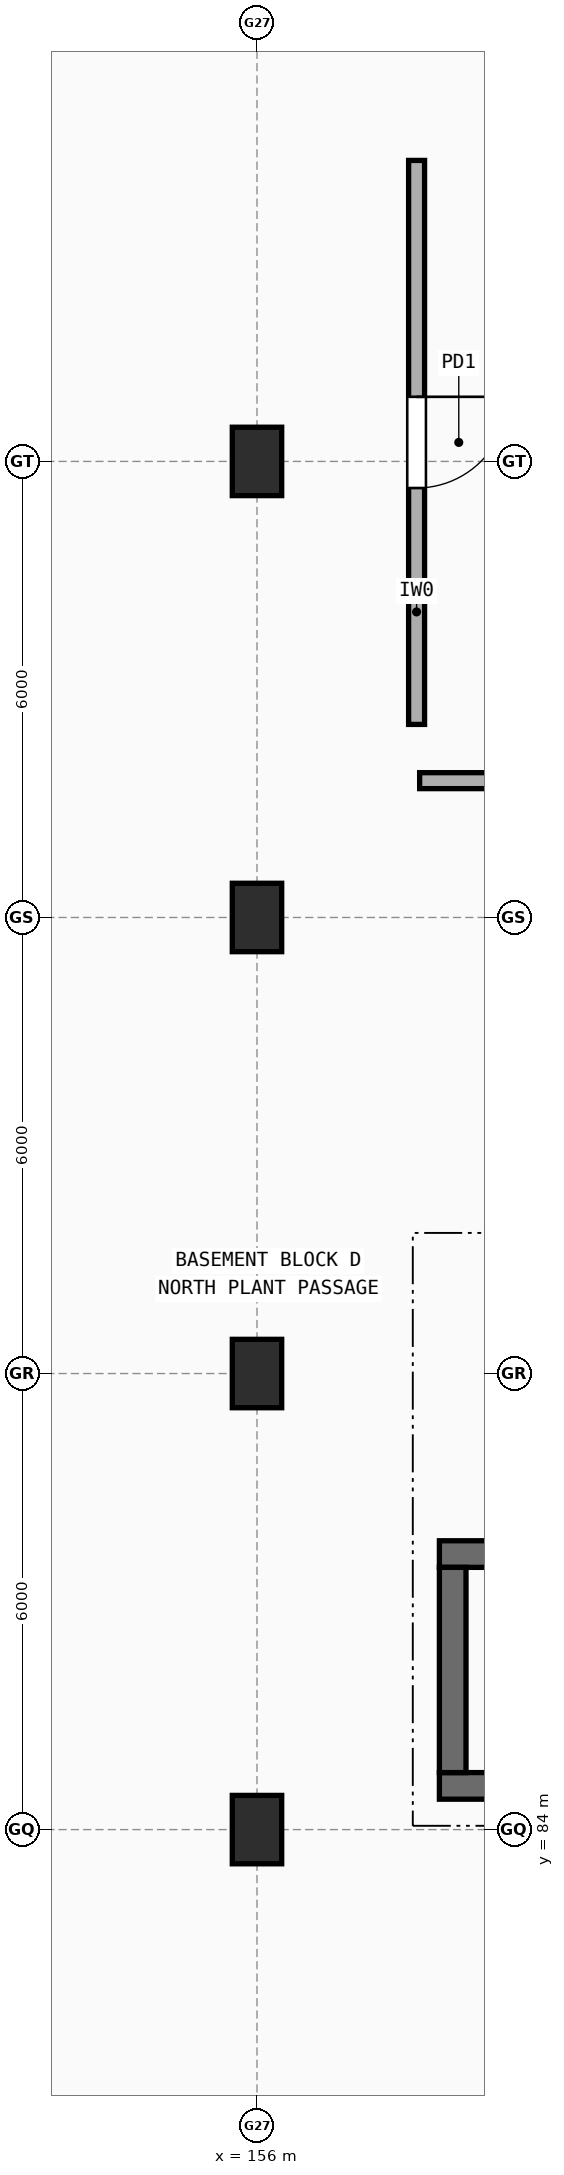
"""IFC4 building model, lengths in metres.
Left out: names, types, materials, properties, quantities, classifications, styles, units other than length and angle.
Written with IfcOpenShell. Run it as: python <this file> out.ifc"""

import sys

from ifc_helpers import new_model, si_unit, direction, frame, frame_2d, origin, origin_2d, place, context, subcontext, project, spatial, rectangle, extrude, element, fill, save


model = new_model("IFC4")
c1 = context("Model", 3, precision=1e-05, world=origin(), true_north=direction((0.0, 1.0)))
c2 = subcontext(c1, "Body", "Model", "MODEL_VIEW")
j1 = project(units=[si_unit("LENGTHUNIT", "METRE"), si_unit("PLANEANGLEUNIT", "RADIAN")], contexts=[c1])
p1 = place(None, origin())
s1 = spatial("IfcSite", under=j1, at=p1, CompositionType="ELEMENT")
p2 = place(p1, origin())
s2 = spatial("IfcBuilding", under=s1, at=p2, CompositionType="ELEMENT")
p3 = place(p2, frame((0.0, 0.0, -4.5)))
s3 = spatial("IfcBuildingStorey", under=s2, at=p3, CompositionType="ELEMENT", Elevation=-4.5)
for number, where, z_axis, x_axis in (
    (1, (156.0, 84.0, 0.0), (0.0, 0.0, 1.0), (1.0, 0.0, 0.0)),
    (2, (156.0, 90.0, 0.0), (0.0, 0.0, 1.0), (1.0, 0.0, 0.0)),
    (3, (156.0, 96.0, 0.0), (0.0, 0.0, 1.0), (1.0, 0.0, 0.0)),
    (4, (156.0, 102.0, 0.0), (0.0, 0.0, 1.0), (1.0, 0.0, 0.0)),
):
    element("IfcColumn", number, at=place(p3, frame(where, z_axis=z_axis, x_axis=x_axis)), inside=s3, PredefinedType="COLUMN", context=c2, shape_type="SweptSolid", body=[
        extrude(rectangle(XDim=0.65, YDim=0.9, at=origin_2d()), origin(), (0.0, 0.0, 1.0), 4.215),
    ])
p4 = place(p3, frame((158.4, 84.575, 0.0), z_axis=(0.0, 0.0, 1.0), x_axis=(1.0, 0.0, 0.0)))
e5 = element("IfcWall", 5, at=p4, inside=s3, PredefinedType="SHEAR", context=c2, shape_type="SweptSolid", body=[
    extrude(rectangle(XDim=11.4, YDim=0.35, at=frame_2d((5.7, 0.0))), origin(), (0.0, 0.0, 1.0), 4.215),
])
p5 = place(p4, frame((5.125, 0.0, 0.0)))
e6 = element("IfcOpeningElement", 6, at=p5, cuts=e5, PredefinedType="OPENING", context=c2, shape_type="SweptSolid", body=[
    extrude(rectangle(XDim=1.15, YDim=2.15, at=frame_2d((0.575, 1.075))), frame((0.0, 0.185, 0.0), z_axis=(0.0, -1.0, 0.0), x_axis=(1.0, 0.0, 0.0)), (0.0, 0.0, 1.0), 0.37),
])
p6 = place(p3, frame((165.05, 87.625, 0.0), z_axis=(0.0, 0.0, 1.0), x_axis=(-1.0, 0.0, 0.0)))
e7 = element("IfcWall", 7, at=p6, inside=s3, PredefinedType="SHEAR", context=c2, shape_type="SweptSolid", body=[
    extrude(rectangle(XDim=6.65, YDim=0.35, at=frame_2d((3.325, 0.0))), origin(), (0.0, 0.0, 1.0), 4.215),
])
p7 = place(p3, frame((158.575, 87.45, 0.0), z_axis=(0.0, 0.0, 1.0), x_axis=(0.0, -1.0, 0.0)))
e8 = element("IfcWall", 8, at=p7, inside=s3, PredefinedType="SHEAR", context=c2, shape_type="SweptSolid", body=[
    extrude(rectangle(XDim=2.7, YDim=0.35, at=frame_2d((1.35, 0.0))), origin(), (0.0, 0.0, 1.0), 4.215),
])
p8 = place(p3, frame((158.1, 98.54, 0.0), z_axis=(0.0, 0.0, 1.0), x_axis=(0.0, 1.0, 0.0)))
e9 = element("IfcWall", 9, at=p8, inside=s3, PredefinedType="SOLIDWALL", context=c2, shape_type="SweptSolid", body=[
    extrude(rectangle(XDim=7.42, YDim=0.21, at=frame_2d((3.71, 0.0))), origin(), (0.0, 0.0, 1.0), 3.547),
])
p9 = place(p8, frame((3.11, 0.0, 0.0)))
e10 = element("IfcOpeningElement", 10, at=p9, cuts=e9, PredefinedType="OPENING", context=c2, shape_type="SweptSolid", body=[
    extrude(rectangle(XDim=1.2, YDim=2.15, at=frame_2d((0.6, 1.075))), frame((0.0, 0.115, 0.0), z_axis=(0.0, -1.0, 0.0), x_axis=(1.0, 0.0, 0.0)), (0.0, 0.0, 1.0), 0.23),
])
p10 = place(p3, frame((158.14, 97.8, 0.0), z_axis=(0.0, 0.0, 1.0), x_axis=(1.0, 0.0, 0.0)))
e11 = element("IfcWall", 11, at=p10, inside=s3, PredefinedType="SOLIDWALL", context=c2, shape_type="SweptSolid", body=[
    extrude(rectangle(XDim=26.32, YDim=0.21, at=frame_2d((13.16, 0.0))), origin(), (0.0, 0.0, 1.0), 3.497),
])
p11 = place(p9, origin())
e12 = element("IfcDoor", 12, at=p11, inside=s3, OperationType="SINGLE_SWING_RIGHT", PredefinedType="DOOR", context=c2, shape_type="SweptSolid", body=[
    extrude(rectangle(XDim=1.2, YDim=2.15, at=frame_2d((0.6, 1.075))), frame((0.0, 0.025, 0.0), z_axis=(0.0, -1.0, 0.0), x_axis=(1.0, 0.0, 0.0)), (0.0, 0.0, 1.0), 0.05),
])
fill(e10, e12)
save(model, sys.argv[1])
